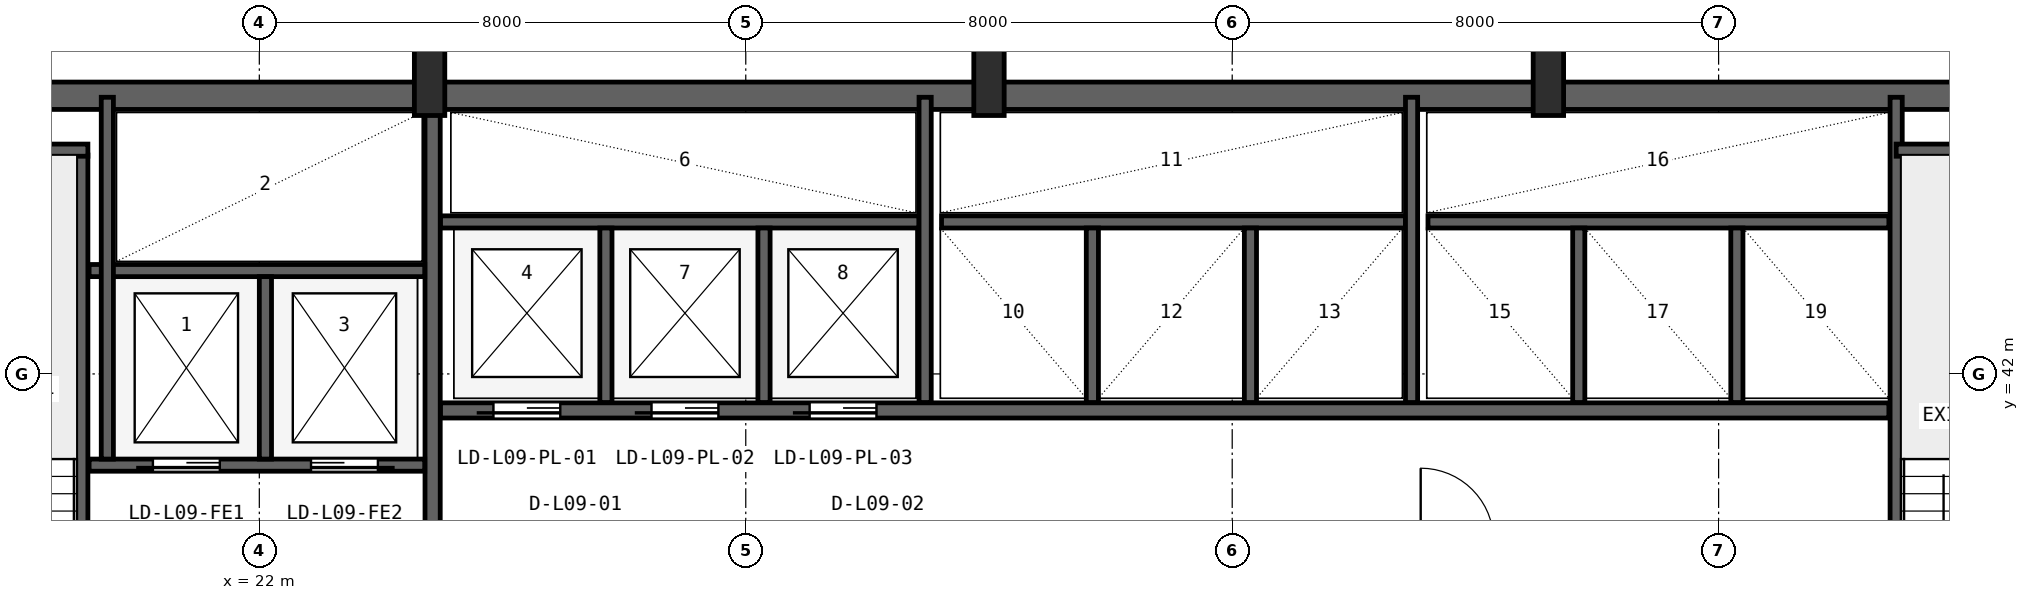
"""IFC4 building model, lengths in metres.
Left out: names, types, materials, properties, quantities, classifications, styles, units other than length and angle.
Written with IfcOpenShell. Run it as: python <this file> out.ifc"""

import sys

from ifc_helpers import new_model, si_unit, direction, frame, frame_2d, origin, origin_2d, place, context, subcontext, project, spatial, rectangle, i_section, extrude, source, transform, mapped, element, fill, save


model = new_model("IFC4")
c1 = context("Model", 3, precision=1e-05, world=origin(), true_north=direction((0.0, 1.0)))
c2 = subcontext(c1, "Body", "Model", "MODEL_VIEW")
j1 = project(units=[si_unit("LENGTHUNIT", "METRE"), si_unit("PLANEANGLEUNIT", "RADIAN")], contexts=[c1])
p1 = place(None, origin())
s1 = spatial("IfcSite", under=j1, at=p1, CompositionType="ELEMENT")
p2 = place(p1, origin())
s2 = spatial("IfcBuilding", under=s1, at=p2, CompositionType="ELEMENT")
p3 = place(p2, frame((0.0, 0.0, 43.2)))
s3 = spatial("IfcBuildingStorey", under=s2, at=p3, CompositionType="ELEMENT", Elevation=43.2)
p4 = place(p3, frame((15.6, 46.575, 0.0), z_axis=(0.0, 0.0, 1.0), x_axis=(1.0, 0.0, 0.0)))
e1 = element("IfcWall", 1, at=p4, inside=s3, PredefinedType="SHEAR", context=c2, shape_type="SweptSolid", body=[
    extrude(rectangle(XDim=36.8, YDim=0.45, at=frame_2d((18.4, 0.0))), origin(), (0.0, 0.0, 1.0), 3.65),
])
m1 = source(origin(), c2, "Body", "SweptSolid", [
    extrude(i_section(OverallWidth=0.5, OverallDepth=1.1, WebThickness=0.018, FlangeThickness=0.032, FilletRadius=0.018, at=origin_2d()), origin(), (0.0, 0.0, 1.0), 3.9),
])
for number, where, z_axis, x_axis in (
    (2, (24.8, 46.8, 0.0), (0.0, 0.0, 1.0), (1.0, 0.0, 0.0)),
    (3, (34.0, 46.8, 0.0), (0.0, 0.0, 1.0), (1.0, 0.0, 0.0)),
    (4, (43.2, 46.8, 0.0), (0.0, 0.0, 1.0), (1.0, 0.0, 0.0)),
):
    element("IfcColumn", number, at=place(p3, frame(where, z_axis=z_axis, x_axis=x_axis)), inside=s3, PredefinedType="COLUMN", context=c2, shape_type="MappedRepresentation", body=[
        mapped(m1, transform((0.0, 0.0, 0.0), x_axis=(1.0, 0.0, 0.0), y_axis=(0.0, 1.0, 0.0), z_axis=(0.0, 0.0, 1.0), scale=1.0)),
    ])
p5 = place(p3, frame((19.08, 35.95, 0.0), z_axis=(0.0, 0.0, 1.0), x_axis=(0.0, 1.0, 0.0)))
e5 = element("IfcWall", 5, at=p5, inside=s3, PredefinedType="SHEAR", context=c2, shape_type="SweptSolid", body=[
    extrude(rectangle(XDim=9.65, YDim=0.2, at=frame_2d((4.825, 0.0))), origin(), (0.0, 0.0, 1.0), 3.65),
])
p6 = place(p5, frame((0.25, 0.0, 0.0)))
e6 = element("IfcOpeningElement", 6, at=p6, cuts=e5, PredefinedType="OPENING", context=c2, shape_type="SweptSolid", body=[
    extrude(rectangle(XDim=0.95, YDim=2.1, at=frame_2d((0.475, 1.05))), frame((0.0, 0.11, 0.0), z_axis=(0.0, -1.0, 0.0), x_axis=(1.0, 0.0, 0.0)), (0.0, 0.0, 1.0), 0.22),
])
p7 = place(p3, frame((15.95, 45.68, 0.0), z_axis=(0.0, 0.0, 1.0), x_axis=(1.0, 0.0, 0.0)))
e7 = element("IfcWall", 7, at=p7, inside=s3, PredefinedType="SHEAR", context=c2, shape_type="SweptSolid", body=[
    extrude(rectangle(XDim=3.23, YDim=0.2, at=frame_2d((1.615, 0.0))), origin(), (0.0, 0.0, 1.0), 3.65),
])
p8 = place(p3, frame((24.85, 36.05, 0.0), z_axis=(0.0, 0.0, 1.0), x_axis=(0.0, 1.0, 0.0)))
e8 = element("IfcWall", 8, at=p8, inside=s3, PredefinedType="SHEAR", context=c2, shape_type="SweptSolid", body=[
    extrude(rectangle(XDim=10.45, YDim=0.25, at=frame_2d((5.225, 0.0))), origin(), (0.0, 0.0, 1.0), 3.65),
])
p9 = place(p3, frame((19.2, 40.5, 0.0), z_axis=(0.0, 0.0, 1.0), x_axis=(1.0, 0.0, 0.0)))
e9 = element("IfcWall", 9, at=p9, inside=s3, PredefinedType="SHEAR", context=c2, shape_type="SweptSolid", body=[
    extrude(rectangle(XDim=5.52, YDim=0.2, at=frame_2d((2.76, 0.0))), origin(), (0.0, 0.0, 1.0), 3.65),
])
p10 = place(p9, frame((1.05, 0.0, 0.0)))
e10 = element("IfcOpeningElement", 10, at=p10, cuts=e9, PredefinedType="OPENING", context=c2, shape_type="SweptSolid", body=[
    extrude(rectangle(XDim=1.1, YDim=2.18, at=frame_2d((0.55, 1.09))), frame((0.0, 0.11, 0.0), z_axis=(0.0, -1.0, 0.0), x_axis=(1.0, 0.0, 0.0)), (0.0, 0.0, 1.0), 0.22),
])
p11 = place(p9, frame((3.65, 0.0, 0.0)))
e11 = element("IfcOpeningElement", 11, at=p11, cuts=e9, PredefinedType="OPENING", context=c2, shape_type="SweptSolid", body=[
    extrude(rectangle(XDim=1.1, YDim=2.18, at=frame_2d((0.55, 1.09))), frame((0.0, 0.11, 0.0), z_axis=(0.0, -1.0, 0.0), x_axis=(1.0, 0.0, 0.0)), (0.0, 0.0, 1.0), 0.22),
])
p12 = place(p3, frame((19.2, 43.7, 0.0), z_axis=(0.0, 0.0, 1.0), x_axis=(1.0, 0.0, 0.0)))
e12 = element("IfcWall", 12, at=p12, inside=s3, PredefinedType="SHEAR", context=c2, shape_type="SweptSolid", body=[
    extrude(rectangle(XDim=5.52, YDim=0.2, at=frame_2d((2.76, 0.0))), origin(), (0.0, 0.0, 1.0), 3.65),
])
p13 = place(p3, frame((22.1, 40.6, 0.0), z_axis=(0.0, 0.0, 1.0), x_axis=(0.0, 1.0, 0.0)))
e13 = element("IfcWall", 13, at=p13, inside=s3, PredefinedType="SHEAR", context=c2, shape_type="SweptSolid", body=[
    extrude(rectangle(XDim=3.0, YDim=0.2, at=frame_2d((1.5, 0.0))), origin(), (0.0, 0.0, 1.0), 3.65),
])
p14 = place(p3, frame((19.5, 40.6, 0.0), z_axis=(0.0, 0.0, 1.0), x_axis=(0.0, 1.0, 0.0)))
e14 = element("IfcWall", 14, at=p14, inside=s3, PredefinedType="SHEAR", context=c2, shape_type="SweptSolid", body=[
    extrude(rectangle(XDim=5.95, YDim=0.2, at=frame_2d((2.975, 0.0))), origin(), (0.0, 0.0, 1.0), 3.65),
])
p15 = place(p3, frame((48.92, 36.05, 0.0), z_axis=(0.0, 0.0, 1.0), x_axis=(0.0, 1.0, 0.0)))
e15 = element("IfcWall", 15, at=p15, inside=s3, PredefinedType="SHEAR", context=c2, shape_type="SweptSolid", body=[
    extrude(rectangle(XDim=10.5, YDim=0.2, at=frame_2d((5.25, 0.0))), origin(), (0.0, 0.0, 1.0), 3.65),
])
p16 = place(p3, frame((48.92, 45.68, 0.0), z_axis=(0.0, 0.0, 1.0), x_axis=(1.0, 0.0, 0.0)))
e16 = element("IfcWall", 16, at=p16, inside=s3, PredefinedType="SHEAR", context=c2, shape_type="SweptSolid", body=[
    extrude(rectangle(XDim=3.18, YDim=0.2, at=frame_2d((1.59, 0.0))), origin(), (0.0, 0.0, 1.0), 3.65),
])
p17 = place(p3, frame((24.98, 41.4, 0.0), z_axis=(0.0, 0.0, 1.0), x_axis=(1.0, 0.0, 0.0)))
e17 = element("IfcWall", 17, at=p17, inside=s3, PredefinedType="SHEAR", context=c2, shape_type="SweptSolid", body=[
    extrude(rectangle(XDim=23.82, YDim=0.25, at=frame_2d((11.91, 0.0))), origin(), (0.0, 0.0, 1.0), 3.65),
])
p18 = place(p17, frame((0.87, 0.0, 0.0)))
e18 = element("IfcOpeningElement", 18, at=p18, cuts=e17, PredefinedType="OPENING", context=c2, shape_type="SweptSolid", body=[
    extrude(rectangle(XDim=1.1, YDim=2.18, at=frame_2d((0.55, 1.09))), frame((0.0, 0.135, 0.0), z_axis=(0.0, -1.0, 0.0), x_axis=(1.0, 0.0, 0.0)), (0.0, 0.0, 1.0), 0.27),
])
p19 = place(p17, frame((3.47, 0.0, 0.0)))
e19 = element("IfcOpeningElement", 19, at=p19, cuts=e17, PredefinedType="OPENING", context=c2, shape_type="SweptSolid", body=[
    extrude(rectangle(XDim=1.1, YDim=2.18, at=frame_2d((0.55, 1.09))), frame((0.0, 0.135, 0.0), z_axis=(0.0, -1.0, 0.0), x_axis=(1.0, 0.0, 0.0)), (0.0, 0.0, 1.0), 0.27),
])
p20 = place(p17, frame((6.07, 0.0, 0.0)))
e20 = element("IfcOpeningElement", 20, at=p20, cuts=e17, PredefinedType="OPENING", context=c2, shape_type="SweptSolid", body=[
    extrude(rectangle(XDim=1.1, YDim=2.18, at=frame_2d((0.55, 1.09))), frame((0.0, 0.135, 0.0), z_axis=(0.0, -1.0, 0.0), x_axis=(1.0, 0.0, 0.0)), (0.0, 0.0, 1.0), 0.27),
])
p21 = place(p3, frame((24.98, 44.5, 0.0), z_axis=(0.0, 0.0, 1.0), x_axis=(1.0, 0.0, 0.0)))
e21 = element("IfcWall", 21, at=p21, inside=s3, PredefinedType="SHEAR", context=c2, shape_type="SweptSolid", body=[
    extrude(rectangle(XDim=7.87, YDim=0.2, at=frame_2d((3.935, 0.0))), origin(), (0.0, 0.0, 1.0), 3.65),
])
for number, where, z_axis, x_axis in (
    (22, (27.7, 41.53, 0.0), (0.0, 0.0, 1.0), (0.0, 1.0, 0.0)),
    (23, (30.3, 41.53, 0.0), (0.0, 0.0, 1.0), (0.0, 1.0, 0.0)),
):
    element("IfcWall", number, at=place(p3, frame(where, z_axis=z_axis, x_axis=x_axis)), inside=s3, PredefinedType="SHEAR", context=c2, shape_type="SweptSolid", body=[
        extrude(rectangle(XDim=2.87, YDim=0.2, at=frame_2d((1.435, 0.0))), origin(), (0.0, 0.0, 1.0), 3.65),
    ])
p22 = place(p3, frame((32.95, 41.53, 0.0), z_axis=(0.0, 0.0, 1.0), x_axis=(0.0, 1.0, 0.0)))
e24 = element("IfcWall", 24, at=p22, inside=s3, PredefinedType="SHEAR", context=c2, shape_type="SweptSolid", body=[
    extrude(rectangle(XDim=5.02, YDim=0.2, at=frame_2d((2.51, 0.0))), origin(), (0.0, 0.0, 1.0), 3.65),
])
p23 = place(p3, frame((33.22, 44.5, 0.0), z_axis=(0.0, 0.0, 1.0), x_axis=(1.0, 0.0, 0.0)))
e25 = element("IfcWall", 25, at=p23, inside=s3, PredefinedType="SHEAR", context=c2, shape_type="SweptSolid", body=[
    extrude(rectangle(XDim=7.63, YDim=0.2, at=frame_2d((3.815, 0.0))), origin(), (0.0, 0.0, 1.0), 3.65),
])
for number, where, z_axis, x_axis in (
    (26, (35.7, 41.53, 0.0), (0.0, 0.0, 1.0), (0.0, 1.0, 0.0)),
    (27, (38.3, 41.53, 0.0), (0.0, 0.0, 1.0), (0.0, 1.0, 0.0)),
):
    element("IfcWall", number, at=place(p3, frame(where, z_axis=z_axis, x_axis=x_axis)), inside=s3, PredefinedType="SHEAR", context=c2, shape_type="SweptSolid", body=[
        extrude(rectangle(XDim=2.87, YDim=0.2, at=frame_2d((1.435, 0.0))), origin(), (0.0, 0.0, 1.0), 3.65),
    ])
p24 = place(p3, frame((40.95, 41.53, 0.0), z_axis=(0.0, 0.0, 1.0), x_axis=(0.0, 1.0, 0.0)))
e28 = element("IfcWall", 28, at=p24, inside=s3, PredefinedType="SHEAR", context=c2, shape_type="SweptSolid", body=[
    extrude(rectangle(XDim=5.02, YDim=0.2, at=frame_2d((2.51, 0.0))), origin(), (0.0, 0.0, 1.0), 3.65),
])
p25 = place(p3, frame((41.22, 44.5, 0.0), z_axis=(0.0, 0.0, 1.0), x_axis=(1.0, 0.0, 0.0)))
e29 = element("IfcWall", 29, at=p25, inside=s3, PredefinedType="SHEAR", context=c2, shape_type="SweptSolid", body=[
    extrude(rectangle(XDim=7.58, YDim=0.2, at=frame_2d((3.79, 0.0))), origin(), (0.0, 0.0, 1.0), 3.65),
])
for number, where, z_axis, x_axis in (
    (30, (43.7, 41.53, 0.0), (0.0, 0.0, 1.0), (0.0, 1.0, 0.0)),
    (31, (46.3, 41.53, 0.0), (0.0, 0.0, 1.0), (0.0, 1.0, 0.0)),
):
    element("IfcWall", number, at=place(p3, frame(where, z_axis=z_axis, x_axis=x_axis)), inside=s3, PredefinedType="SHEAR", context=c2, shape_type="SweptSolid", body=[
        extrude(rectangle(XDim=2.87, YDim=0.2, at=frame_2d((1.435, 0.0))), origin(), (0.0, 0.0, 1.0), 3.65),
    ])
m2 = source(origin(), c2, "Body", "SweptSolid", [
    extrude(rectangle(XDim=1.1, YDim=2.18, at=frame_2d((0.55, 1.09))), frame((0.0, 0.025, 0.0), z_axis=(0.0, -1.0, 0.0), x_axis=(1.0, 0.0, 0.0)), (0.0, 0.0, 1.0), 0.05),
])
p26 = place(p10, frame((1.1, 0.0, 0.0), z_axis=(0.0, 0.0, 1.0), x_axis=(-1.0, 0.0, 0.0)))
e32 = element("IfcDoor", 32, at=p26, inside=s3, OperationType="SLIDING_TO_LEFT", PredefinedType="DOOR", context=c2, shape_type="MappedRepresentation", body=[
    mapped(m2, transform((0.0, 0.0, 0.0), x_axis=(1.0, 0.0, 0.0), y_axis=(0.0, 1.0, 0.0), z_axis=(0.0, 0.0, 1.0), scale=1.0)),
])
fill(e10, e32)
p27 = place(p11, frame((1.1, 0.0, 0.0), z_axis=(0.0, 0.0, 1.0), x_axis=(-1.0, 0.0, 0.0)))
e33 = element("IfcDoor", 33, at=p27, inside=s3, OperationType="SLIDING_TO_RIGHT", PredefinedType="DOOR", context=c2, shape_type="MappedRepresentation", body=[
    mapped(m2, transform((0.0, 0.0, 0.0), x_axis=(1.0, 0.0, 0.0), y_axis=(0.0, 1.0, 0.0), z_axis=(0.0, 0.0, 1.0), scale=1.0)),
])
fill(e11, e33)
p28 = place(p18, frame((1.1, 0.0, 0.0), z_axis=(0.0, 0.0, 1.0), x_axis=(-1.0, 0.0, 0.0)))
e34 = element("IfcDoor", 34, at=p28, inside=s3, OperationType="SLIDING_TO_LEFT", PredefinedType="DOOR", context=c2, shape_type="MappedRepresentation", body=[
    mapped(m2, transform((0.0, 0.0, 0.0), x_axis=(1.0, 0.0, 0.0), y_axis=(0.0, 1.0, 0.0), z_axis=(0.0, 0.0, 1.0), scale=1.0)),
])
fill(e18, e34)
p29 = place(p19, frame((1.1, 0.0, 0.0), z_axis=(0.0, 0.0, 1.0), x_axis=(-1.0, 0.0, 0.0)))
e35 = element("IfcDoor", 35, at=p29, inside=s3, OperationType="SLIDING_TO_LEFT", PredefinedType="DOOR", context=c2, shape_type="MappedRepresentation", body=[
    mapped(m2, transform((0.0, 0.0, 0.0), x_axis=(1.0, 0.0, 0.0), y_axis=(0.0, 1.0, 0.0), z_axis=(0.0, 0.0, 1.0), scale=1.0)),
])
fill(e19, e35)
p30 = place(p20, frame((1.1, 0.0, 0.0), z_axis=(0.0, 0.0, 1.0), x_axis=(-1.0, 0.0, 0.0)))
e36 = element("IfcDoor", 36, at=p30, inside=s3, OperationType="SLIDING_TO_LEFT", PredefinedType="DOOR", context=c2, shape_type="MappedRepresentation", body=[
    mapped(m2, transform((0.0, 0.0, 0.0), x_axis=(1.0, 0.0, 0.0), y_axis=(0.0, 1.0, 0.0), z_axis=(0.0, 0.0, 1.0), scale=1.0)),
])
fill(e20, e36)
save(model, sys.argv[1])
